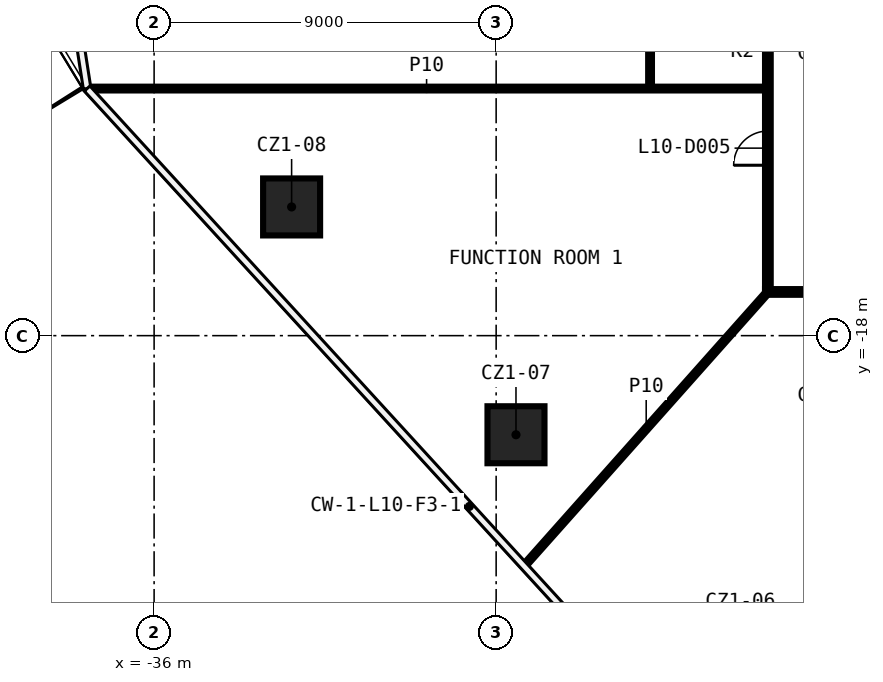
"""IFC4 building model, lengths in metres.
Left out: names, types, materials, properties, quantities, classifications, styles, units other than length and angle.
Written with IfcOpenShell. Run it as: python <this file> out.ifc"""

import sys

from ifc_helpers import new_model, si_unit, direction, frame, frame_2d, origin, origin_2d, place, context, subcontext, project, spatial, rectangle, extrude, element, fill, save


model = new_model("IFC4")
c1 = context("Model", 3, precision=1e-05, world=origin(), true_north=direction((0.0, 1.0)))
c2 = subcontext(c1, "Body", "Model", "MODEL_VIEW")
j1 = project(units=[si_unit("LENGTHUNIT", "METRE"), si_unit("PLANEANGLEUNIT", "RADIAN")], contexts=[c1])
p1 = place(None, origin())
s1 = spatial("IfcSite", under=j1, at=p1, CompositionType="ELEMENT")
p2 = place(p1, origin())
s2 = spatial("IfcBuilding", under=s1, at=p2, CompositionType="ELEMENT")
p3 = place(p2, frame((0.0, 0.0, 58.8)))
s3 = spatial("IfcBuildingStorey", under=s2, at=p3, CompositionType="ELEMENT", Elevation=58.8)
for number, where, z_axis, x_axis in (
    (1, (-26.478, -20.608, 0.0), (0.0, 0.0, 1.0), (1.0, 0.0, 0.0)),
    (2, (-32.382, -14.613, 0.0), (0.0, 0.0, 1.0), (1.0, 0.0, 0.0)),
):
    element("IfcColumn", number, at=place(p3, frame(where, z_axis=z_axis, x_axis=x_axis)), inside=s3, PredefinedType="COLUMN", context=c2, shape_type="SweptSolid", body=[
        extrude(rectangle(XDim=1.5, YDim=1.5, at=origin_2d()), origin(), (0.0, 0.0, 1.0), 3.3),
    ])
p4 = place(p3, frame((19.925, -16.85, 0.0), z_axis=(0.0, 0.0, 1.0), x_axis=(-1.0, 0.0, 0.0)))
e3 = element("IfcWall", 3, at=p4, inside=s3, PredefinedType="PARTITIONING", context=c2, shape_type="SweptSolid", body=[
    extrude(rectangle(XDim=39.85, YDim=0.15, at=frame_2d((19.925, 0.0))), origin(), (0.0, 0.0, 1.0), 3.3),
])
p5 = place(p4, frame((35.041, 0.0, 0.0)))
e4 = element("IfcOpeningElement", 4, at=p5, cuts=e3, PredefinedType="OPENING", context=c2, shape_type="SweptSolid", body=[
    extrude(rectangle(XDim=0.9, YDim=2.1, at=frame_2d((0.45, 1.05))), frame((0.0, 0.085, 0.0), z_axis=(0.0, -1.0, 0.0), x_axis=(1.0, 0.0, 0.0)), (0.0, 0.0, 1.0), 0.17),
])
p6 = place(p4, frame((31.0, 0.0, 0.0)))
e5 = element("IfcOpeningElement", 5, at=p6, cuts=e3, PredefinedType="OPENING", context=c2, shape_type="SweptSolid", body=[
    extrude(rectangle(XDim=1.0, YDim=2.1, at=frame_2d((0.5, 1.05))), frame((0.0, 0.085, 0.0), z_axis=(0.0, -1.0, 0.0), x_axis=(1.0, 0.0, 0.0)), (0.0, 0.0, 1.0), 0.17),
])
p7 = place(p4, frame((25.711, 0.0, 0.0)))
e6 = element("IfcOpeningElement", 6, at=p7, cuts=e3, PredefinedType="OPENING", context=c2, shape_type="SweptSolid", body=[
    extrude(rectangle(XDim=0.9, YDim=2.1, at=frame_2d((0.45, 1.05))), frame((0.0, 0.085, 0.0), z_axis=(0.0, -1.0, 0.0), x_axis=(1.0, 0.0, 0.0)), (0.0, 0.0, 1.0), 0.17),
])
p8 = place(p4, frame((22.072, 0.0, 0.0)))
e7 = element("IfcOpeningElement", 7, at=p8, cuts=e3, PredefinedType="OPENING", context=c2, shape_type="SweptSolid", body=[
    extrude(rectangle(XDim=0.9, YDim=2.1, at=frame_2d((0.45, 1.05))), frame((0.0, 0.085, 0.0), z_axis=(0.0, -1.0, 0.0), x_axis=(1.0, 0.0, 0.0)), (0.0, 0.0, 1.0), 0.17),
])
p9 = place(p4, frame((17.034, 0.0, 0.0)))
e8 = element("IfcOpeningElement", 8, at=p9, cuts=e3, PredefinedType="OPENING", context=c2, shape_type="SweptSolid", body=[
    extrude(rectangle(XDim=0.9, YDim=2.1, at=frame_2d((0.45, 1.05))), frame((0.0, 0.085, 0.0), z_axis=(0.0, -1.0, 0.0), x_axis=(1.0, 0.0, 0.0)), (0.0, 0.0, 1.0), 0.17),
])
p10 = place(p4, frame((13.675, 0.0, 0.0)))
e9 = element("IfcOpeningElement", 9, at=p10, cuts=e3, PredefinedType="OPENING", context=c2, shape_type="SweptSolid", body=[
    extrude(rectangle(XDim=0.9, YDim=2.1, at=frame_2d((0.45, 1.05))), frame((0.0, 0.085, 0.0), z_axis=(0.0, -1.0, 0.0), x_axis=(1.0, 0.0, 0.0)), (0.0, 0.0, 1.0), 0.17),
])
p11 = place(p4, frame((4.031, 0.0, 0.0)))
e10 = element("IfcOpeningElement", 10, at=p11, cuts=e3, PredefinedType="OPENING", context=c2, shape_type="SweptSolid", body=[
    extrude(rectangle(XDim=1.0, YDim=2.1, at=frame_2d((0.5, 1.05))), frame((0.0, 0.085, 0.0), z_axis=(0.0, -1.0, 0.0), x_axis=(1.0, 0.0, 0.0)), (0.0, 0.0, 1.0), 0.17),
])
p12 = place(p3, frame((-37.736, -11.498, 0.0), z_axis=(0.0, 0.0, 1.0), x_axis=(1.0, 0.0, 0.0)))
e11 = element("IfcWall", 11, at=p12, inside=s3, PredefinedType="PARTITIONING", context=c2, shape_type="SweptSolid", body=[
    extrude(rectangle(XDim=17.811, YDim=0.1, at=frame_2d((8.905, 0.0))), origin(), (0.0, 0.0, 1.0), 3.3),
])
p13 = place(p3, frame((-26.253, -24.05, 0.0), z_axis=(0.0, 0.0, 1.0), x_axis=(0.66458555916, 0.747212175059, 0.0)))
e12 = element("IfcWall", 12, at=p13, inside=s3, PredefinedType="PARTITIONING", context=c2, shape_type="SweptSolid", body=[
    extrude(rectangle(XDim=9.635, YDim=0.1, at=frame_2d((4.818, 0.0))), origin(), (0.0, 0.0, 1.0), 3.3),
])
p14 = place(p3, frame((-19.85, -16.775, 0.0), z_axis=(0.0, 0.0, 1.0), x_axis=(0.0, 1.0, 0.0)))
e13 = element("IfcWall", 13, at=p14, inside=s3, PredefinedType="PARTITIONING", context=c2, shape_type="SweptSolid", body=[
    extrude(rectangle(XDim=33.55, YDim=0.15, at=frame_2d((16.775, 0.0))), origin(), (0.0, 0.0, 1.0), 3.3),
])
p15 = place(p14, frame((12.083, 0.0, 0.0)))
e14 = element("IfcOpeningElement", 14, at=p15, cuts=e13, PredefinedType="OPENING", context=c2, shape_type="SweptSolid", body=[
    extrude(rectangle(XDim=1.0, YDim=2.1, at=frame_2d((0.5, 1.05))), frame((0.0, 0.085, 0.0), z_axis=(0.0, -1.0, 0.0), x_axis=(1.0, 0.0, 0.0)), (0.0, 0.0, 1.0), 0.17),
])
p16 = place(p14, frame((10.128, 0.0, 0.0)))
e15 = element("IfcOpeningElement", 15, at=p16, cuts=e13, PredefinedType="OPENING", context=c2, shape_type="SweptSolid", body=[
    extrude(rectangle(XDim=1.0, YDim=2.1, at=frame_2d((0.5, 1.05))), frame((0.0, 0.085, 0.0), z_axis=(0.0, -1.0, 0.0), x_axis=(1.0, 0.0, 0.0)), (0.0, 0.0, 1.0), 0.17),
])
p17 = place(p14, frame((3.259, 0.0, 0.0)))
e16 = element("IfcOpeningElement", 16, at=p17, cuts=e13, PredefinedType="OPENING", context=c2, shape_type="SweptSolid", body=[
    extrude(rectangle(XDim=0.9, YDim=2.1, at=frame_2d((0.45, 1.05))), frame((0.0, 0.085, 0.0), z_axis=(0.0, -1.0, 0.0), x_axis=(1.0, 0.0, 0.0)), (0.0, 0.0, 1.0), 0.17),
])
p18 = place(p14, frame((30.799, 0.0, 0.0)))
e17 = element("IfcOpeningElement", 17, at=p18, cuts=e13, PredefinedType="OPENING", context=c2, shape_type="SweptSolid", body=[
    extrude(rectangle(XDim=1.0, YDim=2.1, at=frame_2d((0.5, 1.05))), frame((0.0, 0.085, 0.0), z_axis=(0.0, -1.0, 0.0), x_axis=(1.0, 0.0, 0.0)), (0.0, 0.0, 1.0), 0.17),
])
p19 = place(p14, frame((22.638, 0.0, 0.0)))
e18 = element("IfcOpeningElement", 18, at=p19, cuts=e13, PredefinedType="OPENING", context=c2, shape_type="SweptSolid", body=[
    extrude(rectangle(XDim=1.0, YDim=2.1, at=frame_2d((0.5, 1.05))), frame((0.0, 0.085, 0.0), z_axis=(0.0, -1.0, 0.0), x_axis=(1.0, 0.0, 0.0)), (0.0, 0.0, 1.0), 0.17),
])
p20 = place(p14, frame((18.681, 0.0, 0.0)))
e19 = element("IfcOpeningElement", 19, at=p20, cuts=e13, PredefinedType="OPENING", context=c2, shape_type="SweptSolid", body=[
    extrude(rectangle(XDim=0.9, YDim=2.1, at=frame_2d((0.45, 1.05))), frame((0.0, 0.085, 0.0), z_axis=(0.0, -1.0, 0.0), x_axis=(1.0, 0.0, 0.0)), (0.0, 0.0, 1.0), 0.17),
])
p21 = place(p3, frame((-22.95, -11.448, 0.0), z_axis=(0.0, 0.0, 1.0), x_axis=(0.0, 1.0, 0.0)))
e20 = element("IfcWall", 20, at=p21, inside=s3, PredefinedType="PARTITIONING", context=c2, shape_type="SweptSolid", body=[
    extrude(rectangle(XDim=2.3, YDim=0.1, at=frame_2d((1.15, 0.0))), origin(), (0.0, 0.0, 1.0), 3.3),
])
p22 = place(p17, origin())
e21 = element("IfcDoor", 21, at=p22, inside=s3, OperationType="SINGLE_SWING_RIGHT", PredefinedType="DOOR", context=c2, shape_type="SweptSolid", body=[
    extrude(rectangle(XDim=0.9, YDim=2.1, at=frame_2d((0.45, 1.05))), frame((0.0, 0.025, 0.0), z_axis=(0.0, -1.0, 0.0), x_axis=(1.0, 0.0, 0.0)), (0.0, 0.0, 1.0), 0.05),
])
fill(e16, e21)
save(model, sys.argv[1])
